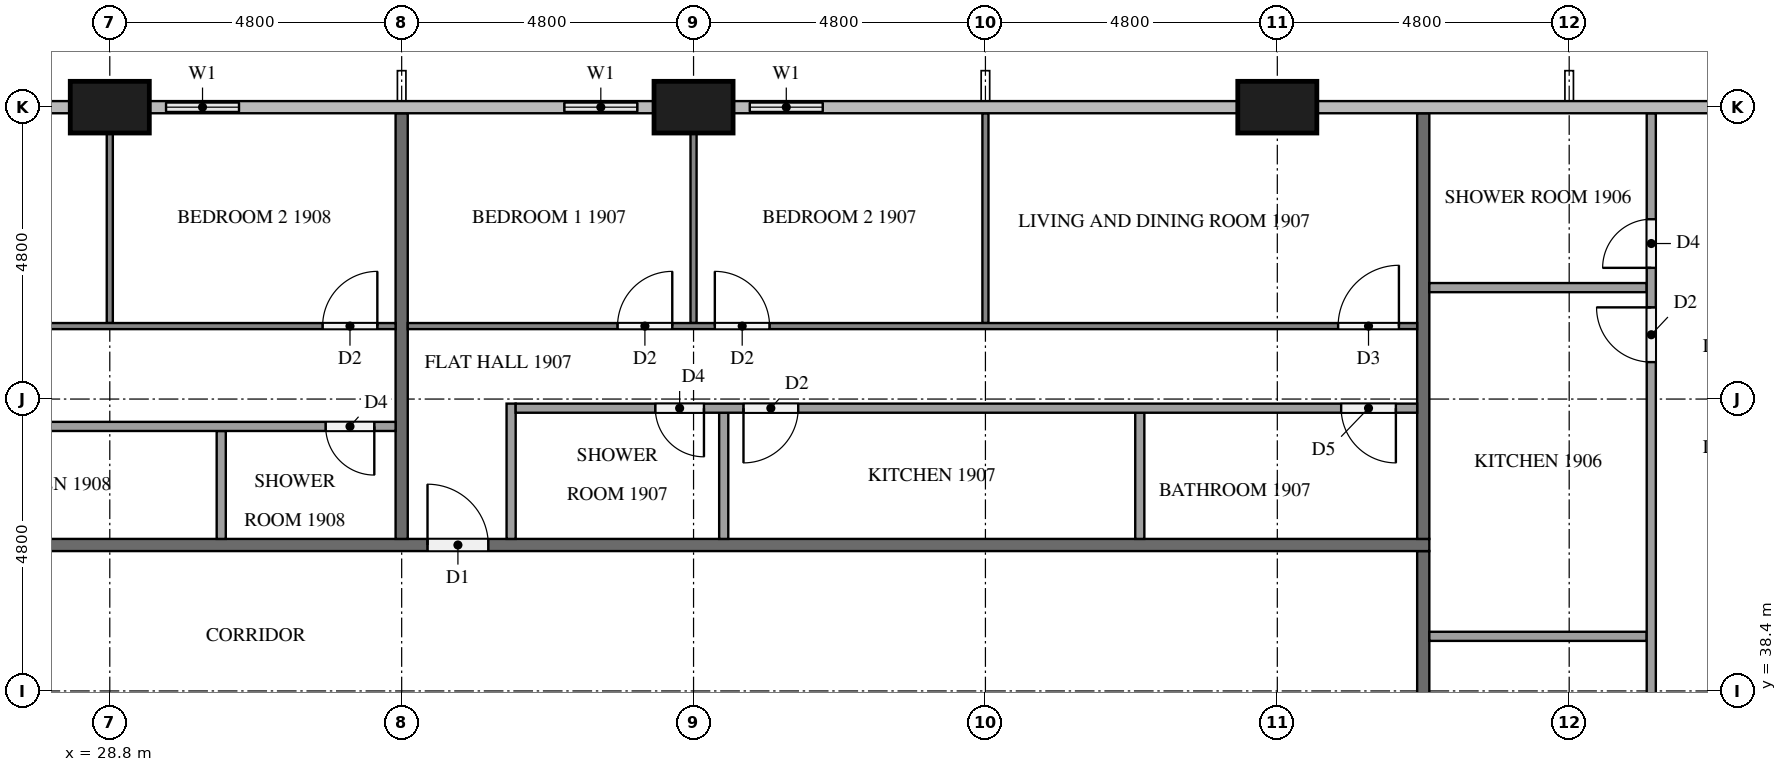
"""IFC4 building model, lengths in metres.
Left out: names, types, materials, properties, quantities, classifications, styles, units other than length and angle.
Written with IfcOpenShell. Run it as: python <this file> out.ifc"""

import sys

from ifc_helpers import new_model, si_unit, direction, frame, frame_2d, origin, origin_2d, place, context, subcontext, project, spatial, rectangle, extrude, element, fill, save


model = new_model("IFC4")
c1 = context("Model", 3, precision=1e-05, world=origin(), true_north=direction((0.0, 1.0)))
c2 = subcontext(c1, "Body", "Model", "MODEL_VIEW")
j1 = project(units=[si_unit("LENGTHUNIT", "METRE"), si_unit("PLANEANGLEUNIT", "RADIAN")], contexts=[c1])
p1 = place(None, origin())
s1 = spatial("IfcSite", under=j1, at=p1, CompositionType="ELEMENT")
p2 = place(p1, origin())
s2 = spatial("IfcBuilding", under=s1, at=p2, CompositionType="ELEMENT")
p3 = place(p2, frame((0.0, 0.0, 76.8)))
s3 = spatial("IfcBuildingStorey", under=s2, at=p3, CompositionType="ELEMENT", Elevation=76.8)
for number, where, z_axis, x_axis in (
    (1, (48.0, 48.0, 0.0), (0.0, 0.0, 1.0), (1.0, 0.0, 0.0)),
    (2, (38.4, 48.0, 0.0), (0.0, 0.0, 1.0), (1.0, 0.0, 0.0)),
    (3, (28.8, 48.0, 0.0), (0.0, 0.0, 1.0), (1.0, 0.0, 0.0)),
):
    element("IfcColumn", number, at=place(p3, frame(where, z_axis=z_axis, x_axis=x_axis)), inside=s3, PredefinedType="COLUMN", context=c2, shape_type="SweptSolid", body=[
        extrude(rectangle(XDim=1.3, YDim=0.85, at=origin_2d()), origin(), (0.0, 0.0, 1.0), 3.2),
    ])
p4 = place(p3, frame((40.8, 48.0, 0.0), z_axis=(0.0, 0.0, 1.0), x_axis=(-1.0, 0.0, 0.0)))
e4 = element("IfcWall", 4, at=p4, inside=s3, PredefinedType="SOLIDWALL", context=c2, shape_type="SweptSolid", body=[
    extrude(rectangle(XDim=1.75, YDim=0.15, at=frame_2d((0.875, 0.0))), origin(), (0.0, 0.0, 1.0), 3.2),
])
p5 = place(p4, frame((0.275, 0.0, 0.9)))
e5 = element("IfcOpeningElement", 5, at=p5, cuts=e4, PredefinedType="OPENING", context=c2, shape_type="SweptSolid", body=[
    extrude(rectangle(XDim=1.2, YDim=1.4, at=frame_2d((0.6, 0.7))), frame((0.0, 0.085, 0.0), z_axis=(0.0, -1.0, 0.0), x_axis=(1.0, 0.0, 0.0)), (0.0, 0.0, 1.0), 0.17),
])
p6 = place(p3, frame((37.75, 48.0, 0.0), z_axis=(0.0, 0.0, 1.0), x_axis=(-1.0, 0.0, 0.0)))
e6 = element("IfcWall", 6, at=p6, inside=s3, PredefinedType="SOLIDWALL", context=c2, shape_type="SweptSolid", body=[
    extrude(rectangle(XDim=1.75, YDim=0.15, at=frame_2d((0.875, 0.0))), origin(), (0.0, 0.0, 1.0), 3.2),
])
p7 = place(p6, frame((0.275, 0.0, 0.9)))
e7 = element("IfcOpeningElement", 7, at=p7, cuts=e6, PredefinedType="OPENING", context=c2, shape_type="SweptSolid", body=[
    extrude(rectangle(XDim=1.2, YDim=1.4, at=frame_2d((0.6, 0.7))), frame((0.0, 0.085, 0.0), z_axis=(0.0, -1.0, 0.0), x_axis=(1.0, 0.0, 0.0)), (0.0, 0.0, 1.0), 0.17),
])
p8 = place(p3, frame((31.2, 48.0, 0.0), z_axis=(0.0, 0.0, 1.0), x_axis=(-1.0, 0.0, 0.0)))
e8 = element("IfcWall", 8, at=p8, inside=s3, PredefinedType="SOLIDWALL", context=c2, shape_type="SweptSolid", body=[
    extrude(rectangle(XDim=1.75, YDim=0.15, at=frame_2d((0.875, 0.0))), origin(), (0.0, 0.0, 1.0), 3.2),
])
p9 = place(p8, frame((0.275, 0.0, 0.9)))
e9 = element("IfcOpeningElement", 9, at=p9, cuts=e8, PredefinedType="OPENING", context=c2, shape_type="SweptSolid", body=[
    extrude(rectangle(XDim=1.2, YDim=1.4, at=frame_2d((0.6, 0.7))), frame((0.0, 0.085, 0.0), z_axis=(0.0, -1.0, 0.0), x_axis=(1.0, 0.0, 0.0)), (0.0, 0.0, 1.0), 0.17),
])
p10 = place(p3, frame((50.4, 40.7, 0.0), z_axis=(0.0, 0.0, 1.0), x_axis=(0.0, -1.0, 0.0)))
e10 = element("IfcWall", 10, at=p10, inside=s3, PredefinedType="PARTITIONING", context=c2, shape_type="SweptSolid", body=[
    extrude(rectangle(XDim=28.6, YDim=0.2, at=frame_2d((14.3, 0.0))), origin(), (0.0, 0.0, 1.0), 3.2),
])
p11 = place(p10, frame((21.875, 0.0, 0.0)))
e11 = element("IfcOpeningElement", 11, at=p11, cuts=e10, PredefinedType="OPENING", context=c2, shape_type="SweptSolid", body=[
    extrude(rectangle(XDim=1.1, YDim=2.1, at=frame_2d((0.55, 1.05))), frame((0.0, 0.11, 0.0), z_axis=(0.0, -1.0, 0.0), x_axis=(1.0, 0.0, 0.0)), (0.0, 0.0, 1.0), 0.22),
])
p12 = place(p10, frame((20.075, 0.0, 0.0)))
e12 = element("IfcOpeningElement", 12, at=p12, cuts=e10, PredefinedType="OPENING", context=c2, shape_type="SweptSolid", body=[
    extrude(rectangle(XDim=1.0, YDim=2.1, at=frame_2d((0.5, 1.05))), frame((0.0, 0.11, 0.0), z_axis=(0.0, -1.0, 0.0), x_axis=(1.0, 0.0, 0.0)), (0.0, 0.0, 1.0), 0.22),
])
p13 = place(p10, frame((5.675, 0.0, 0.0)))
e13 = element("IfcOpeningElement", 13, at=p13, cuts=e10, PredefinedType="OPENING", context=c2, shape_type="SweptSolid", body=[
    extrude(rectangle(XDim=1.0, YDim=2.1, at=frame_2d((0.5, 1.05))), frame((0.0, 0.11, 0.0), z_axis=(0.0, -1.0, 0.0), x_axis=(1.0, 0.0, 0.0)), (0.0, 0.0, 1.0), 0.22),
])
p14 = place(p3, frame((11.9, 40.8, 0.0), z_axis=(0.0, 0.0, 1.0), x_axis=(1.0, 0.0, 0.0)))
e14 = element("IfcWall", 14, at=p14, inside=s3, PredefinedType="PARTITIONING", context=c2, shape_type="SweptSolid", body=[
    extrude(rectangle(XDim=38.6, YDim=0.2, at=frame_2d((19.3, 0.0))), origin(), (0.0, 0.0, 1.0), 3.2),
])
p15 = place(p14, frame((22.125, 0.0, 0.0)))
e15 = element("IfcOpeningElement", 15, at=p15, cuts=e14, PredefinedType="OPENING", context=c2, shape_type="SweptSolid", body=[
    extrude(rectangle(XDim=1.0, YDim=2.1, at=frame_2d((0.5, 1.05))), frame((0.0, 0.11, 0.0), z_axis=(0.0, -1.0, 0.0), x_axis=(1.0, 0.0, 0.0)), (0.0, 0.0, 1.0), 0.22),
])
p16 = place(p14, frame((7.725, 0.0, 0.0)))
e16 = element("IfcOpeningElement", 16, at=p16, cuts=e14, PredefinedType="OPENING", context=c2, shape_type="SweptSolid", body=[
    extrude(rectangle(XDim=1.0, YDim=2.1, at=frame_2d((0.5, 1.05))), frame((0.0, 0.11, 0.0), z_axis=(0.0, -1.0, 0.0), x_axis=(1.0, 0.0, 0.0)), (0.0, 0.0, 1.0), 0.22),
])
p17 = place(p14, frame((5.875, 0.0, 0.0)))
e17 = element("IfcOpeningElement", 17, at=p17, cuts=e14, PredefinedType="OPENING", context=c2, shape_type="SweptSolid", body=[
    extrude(rectangle(XDim=1.0, YDim=2.1, at=frame_2d((0.5, 1.05))), frame((0.0, 0.11, 0.0), z_axis=(0.0, -1.0, 0.0), x_axis=(1.0, 0.0, 0.0)), (0.0, 0.0, 1.0), 0.22),
])
for number, where, z_axis, x_axis in (
    (18, (50.4, 40.9, 0.0), (0.0, 0.0, 1.0), (0.0, 1.0, 0.0)),
    (19, (33.6, 47.9, 0.0), (0.0, 0.0, 1.0), (0.0, -1.0, 0.0)),
):
    element("IfcWall", number, at=place(p3, frame(where, z_axis=z_axis, x_axis=x_axis)), inside=s3, PredefinedType="PARTITIONING", context=c2, shape_type="SweptSolid", body=[
        extrude(rectangle(XDim=7.0, YDim=0.2, at=frame_2d((3.5, 0.0))), origin(), (0.0, 0.0, 1.0), 3.2),
    ])
for number, where, z_axis, x_axis in (
    (20, (50.5, 39.298, 0.0), (0.0, 0.0, 1.0), (1.0, 0.0, 0.0)),
    (21, (50.5, 45.033, 0.0), (0.0, 0.0, 1.0), (1.0, 0.0, 0.0)),
):
    element("IfcWall", number, at=place(p3, frame(where, z_axis=z_axis, x_axis=x_axis)), inside=s3, PredefinedType="PARTITIONING", context=c2, shape_type="SweptSolid", body=[
        extrude(rectangle(XDim=3.575, YDim=0.15, at=frame_2d((1.788, 0.0))), origin(), (0.0, 0.0, 1.0), 3.2),
    ])
p18 = place(p3, frame((54.15, 35.475, 0.0), z_axis=(0.0, 0.0, 1.0), x_axis=(0.0, 1.0, 0.0)))
e22 = element("IfcWall", 22, at=p18, inside=s3, PredefinedType="PARTITIONING", context=c2, shape_type="SweptSolid", body=[
    extrude(rectangle(XDim=12.425, YDim=0.15, at=frame_2d((6.212, 0.0))), origin(), (0.0, 0.0, 1.0), 3.2),
])
p19 = place(p18, frame((0.3, 0.0, 0.0)))
e23 = element("IfcOpeningElement", 23, at=p19, cuts=e22, PredefinedType="OPENING", context=c2, shape_type="SweptSolid", body=[
    extrude(rectangle(XDim=0.9, YDim=2.1, at=frame_2d((0.45, 1.05))), frame((0.0, 0.085, 0.0), z_axis=(0.0, -1.0, 0.0), x_axis=(1.0, 0.0, 0.0)), (0.0, 0.0, 1.0), 0.17),
])
p20 = place(p18, frame((8.333, 0.0, 0.0)))
e24 = element("IfcOpeningElement", 24, at=p20, cuts=e22, PredefinedType="OPENING", context=c2, shape_type="SweptSolid", body=[
    extrude(rectangle(XDim=0.9, YDim=2.1, at=frame_2d((0.45, 1.05))), frame((0.0, 0.085, 0.0), z_axis=(0.0, -1.0, 0.0), x_axis=(1.0, 0.0, 0.0)), (0.0, 0.0, 1.0), 0.17),
])
p21 = place(p18, frame((9.883, 0.0, 0.0)))
e25 = element("IfcOpeningElement", 25, at=p21, cuts=e22, PredefinedType="OPENING", context=c2, shape_type="SweptSolid", body=[
    extrude(rectangle(XDim=0.8, YDim=2.1, at=frame_2d((0.4, 1.05))), frame((0.0, 0.085, 0.0), z_axis=(0.0, -1.0, 0.0), x_axis=(1.0, 0.0, 0.0)), (0.0, 0.0, 1.0), 0.17),
])
p22 = place(p3, frame((38.4, 44.45, 0.0), z_axis=(0.0, 0.0, 1.0), x_axis=(0.0, 1.0, 0.0)))
e26 = element("IfcWall", 26, at=p22, inside=s3, PredefinedType="PARTITIONING", context=c2, shape_type="SweptSolid", body=[
    extrude(rectangle(XDim=3.125, YDim=0.1, at=frame_2d((1.562, 0.0))), origin(), (0.0, 0.0, 1.0), 3.2),
])
p23 = place(p3, frame((43.2, 44.45, 0.0), z_axis=(0.0, 0.0, 1.0), x_axis=(0.0, 1.0, 0.0)))
e27 = element("IfcWall", 27, at=p23, inside=s3, PredefinedType="PARTITIONING", context=c2, shape_type="SweptSolid", body=[
    extrude(rectangle(XDim=3.45, YDim=0.1, at=frame_2d((1.725, 0.0))), origin(), (0.0, 0.0, 1.0), 3.2),
])
p24 = place(p3, frame((33.7, 44.4, 0.0), z_axis=(0.0, 0.0, 1.0), x_axis=(1.0, 0.0, 0.0)))
e28 = element("IfcWall", 28, at=p24, inside=s3, PredefinedType="PARTITIONING", context=c2, shape_type="SweptSolid", body=[
    extrude(rectangle(XDim=16.6, YDim=0.1, at=frame_2d((8.3, 0.0))), origin(), (0.0, 0.0, 1.0), 3.2),
])
p25 = place(p24, frame((3.45, 0.0, 0.0)))
e29 = element("IfcOpeningElement", 29, at=p25, cuts=e28, PredefinedType="OPENING", context=c2, shape_type="SweptSolid", body=[
    extrude(rectangle(XDim=0.9, YDim=2.1, at=frame_2d((0.45, 1.05))), frame((0.0, 0.06, 0.0), z_axis=(0.0, -1.0, 0.0), x_axis=(1.0, 0.0, 0.0)), (0.0, 0.0, 1.0), 0.12),
])
p26 = place(p24, frame((5.05, 0.0, 0.0)))
e30 = element("IfcOpeningElement", 30, at=p26, cuts=e28, PredefinedType="OPENING", context=c2, shape_type="SweptSolid", body=[
    extrude(rectangle(XDim=0.9, YDim=2.1, at=frame_2d((0.45, 1.05))), frame((0.0, 0.06, 0.0), z_axis=(0.0, -1.0, 0.0), x_axis=(1.0, 0.0, 0.0)), (0.0, 0.0, 1.0), 0.12),
])
p27 = place(p24, frame((15.3, 0.0, 0.0)))
e31 = element("IfcOpeningElement", 31, at=p27, cuts=e28, PredefinedType="OPENING", context=c2, shape_type="SweptSolid", body=[
    extrude(rectangle(XDim=1.0, YDim=2.1, at=frame_2d((0.5, 1.05))), frame((0.0, 0.06, 0.0), z_axis=(0.0, -1.0, 0.0), x_axis=(1.0, 0.0, 0.0)), (0.0, 0.0, 1.0), 0.12),
])
for number, where, z_axis, x_axis in (
    (32, (38.896, 40.9, 0.0), (0.0, 0.0, 1.0), (0.0, 1.0, 0.0)),
    (33, (45.739, 40.9, 0.0), (0.0, 0.0, 1.0), (0.0, 1.0, 0.0)),
):
    element("IfcWall", number, at=place(p3, frame(where, z_axis=z_axis, x_axis=x_axis)), inside=s3, PredefinedType="PARTITIONING", context=c2, shape_type="SweptSolid", body=[
        extrude(rectangle(XDim=2.075, YDim=0.15, at=frame_2d((1.038, 0.0))), origin(), (0.0, 0.0, 1.0), 3.2),
    ])
p28 = place(p3, frame((35.4, 40.9, 0.0), z_axis=(0.0, 0.0, 1.0), x_axis=(0.0, 1.0, 0.0)))
e34 = element("IfcWall", 34, at=p28, inside=s3, PredefinedType="PARTITIONING", context=c2, shape_type="SweptSolid", body=[
    extrude(rectangle(XDim=2.225, YDim=0.15, at=frame_2d((1.113, 0.0))), origin(), (0.0, 0.0, 1.0), 3.2),
])
p29 = place(p3, frame((50.3, 43.05, 0.0), z_axis=(0.0, 0.0, 1.0), x_axis=(-1.0, 0.0, 0.0)))
e35 = element("IfcWall", 35, at=p29, inside=s3, PredefinedType="PARTITIONING", context=c2, shape_type="SweptSolid", body=[
    extrude(rectangle(XDim=14.825, YDim=0.15, at=frame_2d((7.413, 0.0))), origin(), (0.0, 0.0, 1.0), 3.2),
])
p30 = place(p29, frame((11.729, 0.0, 0.0)))
e36 = element("IfcOpeningElement", 36, at=p30, cuts=e35, PredefinedType="OPENING", context=c2, shape_type="SweptSolid", body=[
    extrude(rectangle(XDim=0.8, YDim=2.1, at=frame_2d((0.4, 1.05))), frame((0.0, 0.085, 0.0), z_axis=(0.0, -1.0, 0.0), x_axis=(1.0, 0.0, 0.0)), (0.0, 0.0, 1.0), 0.17),
])
p31 = place(p29, frame((10.179, 0.0, 0.0)))
e37 = element("IfcOpeningElement", 37, at=p31, cuts=e35, PredefinedType="OPENING", context=c2, shape_type="SweptSolid", body=[
    extrude(rectangle(XDim=0.9, YDim=2.1, at=frame_2d((0.45, 1.05))), frame((0.0, 0.085, 0.0), z_axis=(0.0, -1.0, 0.0), x_axis=(1.0, 0.0, 0.0)), (0.0, 0.0, 1.0), 0.17),
])
p32 = place(p29, frame((0.35, 0.0, 0.0)))
e38 = element("IfcOpeningElement", 38, at=p32, cuts=e35, PredefinedType="OPENING", context=c2, shape_type="SweptSolid", body=[
    extrude(rectangle(XDim=0.9, YDim=2.1, at=frame_2d((0.45, 1.05))), frame((0.0, 0.085, 0.0), z_axis=(0.0, -1.0, 0.0), x_axis=(1.0, 0.0, 0.0)), (0.0, 0.0, 1.0), 0.17),
])
p33 = place(p3, frame((28.8, 44.45, 0.0), z_axis=(0.0, 0.0, 1.0), x_axis=(0.0, 1.0, 0.0)))
e39 = element("IfcWall", 39, at=p33, inside=s3, PredefinedType="PARTITIONING", context=c2, shape_type="SweptSolid", body=[
    extrude(rectangle(XDim=3.125, YDim=0.1, at=frame_2d((1.562, 0.0))), origin(), (0.0, 0.0, 1.0), 3.2),
])
p34 = place(p3, frame((19.3, 44.4, 0.0), z_axis=(0.0, 0.0, 1.0), x_axis=(1.0, 0.0, 0.0)))
e40 = element("IfcWall", 40, at=p34, inside=s3, PredefinedType="PARTITIONING", context=c2, shape_type="SweptSolid", body=[
    extrude(rectangle(XDim=14.2, YDim=0.1, at=frame_2d((7.1, 0.0))), origin(), (0.0, 0.0, 1.0), 3.2),
])
p35 = place(p34, frame((3.45, 0.0, 0.0)))
e41 = element("IfcOpeningElement", 41, at=p35, cuts=e40, PredefinedType="OPENING", context=c2, shape_type="SweptSolid", body=[
    extrude(rectangle(XDim=0.9, YDim=2.1, at=frame_2d((0.45, 1.05))), frame((0.0, 0.06, 0.0), z_axis=(0.0, -1.0, 0.0), x_axis=(1.0, 0.0, 0.0)), (0.0, 0.0, 1.0), 0.12),
])
p36 = place(p34, frame((5.05, 0.0, 0.0)))
e42 = element("IfcOpeningElement", 42, at=p36, cuts=e40, PredefinedType="OPENING", context=c2, shape_type="SweptSolid", body=[
    extrude(rectangle(XDim=1.0, YDim=2.1, at=frame_2d((0.5, 1.05))), frame((0.0, 0.06, 0.0), z_axis=(0.0, -1.0, 0.0), x_axis=(1.0, 0.0, 0.0)), (0.0, 0.0, 1.0), 0.12),
])
p37 = place(p34, frame((13.0, 0.0, 0.0)))
e43 = element("IfcOpeningElement", 43, at=p37, cuts=e40, PredefinedType="OPENING", context=c2, shape_type="SweptSolid", body=[
    extrude(rectangle(XDim=0.9, YDim=2.1, at=frame_2d((0.45, 1.05))), frame((0.0, 0.06, 0.0), z_axis=(0.0, -1.0, 0.0), x_axis=(1.0, 0.0, 0.0)), (0.0, 0.0, 1.0), 0.12),
])
p38 = place(p3, frame((30.633, 40.9, 0.0), z_axis=(0.0, 0.0, 1.0), x_axis=(0.0, 1.0, 0.0)))
e44 = element("IfcWall", 44, at=p38, inside=s3, PredefinedType="PARTITIONING", context=c2, shape_type="SweptSolid", body=[
    extrude(rectangle(XDim=1.775, YDim=0.15, at=frame_2d((0.888, 0.0))), origin(), (0.0, 0.0, 1.0), 3.2),
])
p39 = place(p3, frame((33.5, 42.75, 0.0), z_axis=(0.0, 0.0, 1.0), x_axis=(-1.0, 0.0, 0.0)))
e45 = element("IfcWall", 45, at=p39, inside=s3, PredefinedType="PARTITIONING", context=c2, shape_type="SweptSolid", body=[
    extrude(rectangle(XDim=12.425, YDim=0.15, at=frame_2d((6.212, 0.0))), origin(), (0.0, 0.0, 1.0), 3.2),
])
p40 = place(p39, frame((8.927, 0.0, 0.0)))
e46 = element("IfcOpeningElement", 46, at=p40, cuts=e45, PredefinedType="OPENING", context=c2, shape_type="SweptSolid", body=[
    extrude(rectangle(XDim=0.9, YDim=2.1, at=frame_2d((0.45, 1.05))), frame((0.0, 0.085, 0.0), z_axis=(0.0, -1.0, 0.0), x_axis=(1.0, 0.0, 0.0)), (0.0, 0.0, 1.0), 0.17),
])
p41 = place(p39, frame((7.377, 0.0, 0.0)))
e47 = element("IfcOpeningElement", 47, at=p41, cuts=e45, PredefinedType="OPENING", context=c2, shape_type="SweptSolid", body=[
    extrude(rectangle(XDim=0.9, YDim=2.1, at=frame_2d((0.45, 1.05))), frame((0.0, 0.085, 0.0), z_axis=(0.0, -1.0, 0.0), x_axis=(1.0, 0.0, 0.0)), (0.0, 0.0, 1.0), 0.17),
])
p42 = place(p39, frame((0.35, 0.0, 0.0)))
e48 = element("IfcOpeningElement", 48, at=p42, cuts=e45, PredefinedType="OPENING", context=c2, shape_type="SweptSolid", body=[
    extrude(rectangle(XDim=0.8, YDim=2.1, at=frame_2d((0.4, 1.05))), frame((0.0, 0.085, 0.0), z_axis=(0.0, -1.0, 0.0), x_axis=(1.0, 0.0, 0.0)), (0.0, 0.0, 1.0), 0.17),
])
p43 = place(p5, origin())
e49 = element("IfcWindow", 49, at=p43, inside=s3, PartitioningType="SINGLE_PANEL", PredefinedType="WINDOW", context=c2, shape_type="SweptSolid", body=[
    extrude(rectangle(XDim=1.2, YDim=1.4, at=frame_2d((0.6, 0.7))), frame((0.0, 0.03, 0.0), z_axis=(0.0, -1.0, 0.0), x_axis=(1.0, 0.0, 0.0)), (0.0, 0.0, 1.0), 0.06),
])
fill(e5, e49)
p44 = place(p7, origin())
e50 = element("IfcWindow", 50, at=p44, inside=s3, PartitioningType="SINGLE_PANEL", PredefinedType="WINDOW", context=c2, shape_type="SweptSolid", body=[
    extrude(rectangle(XDim=1.2, YDim=1.4, at=frame_2d((0.6, 0.7))), frame((0.0, 0.03, 0.0), z_axis=(0.0, -1.0, 0.0), x_axis=(1.0, 0.0, 0.0)), (0.0, 0.0, 1.0), 0.06),
])
fill(e7, e50)
p45 = place(p9, origin())
e51 = element("IfcWindow", 51, at=p45, inside=s3, PartitioningType="SINGLE_PANEL", PredefinedType="WINDOW", context=c2, shape_type="SweptSolid", body=[
    extrude(rectangle(XDim=1.2, YDim=1.4, at=frame_2d((0.6, 0.7))), frame((0.0, 0.03, 0.0), z_axis=(0.0, -1.0, 0.0), x_axis=(1.0, 0.0, 0.0)), (0.0, 0.0, 1.0), 0.06),
])
fill(e9, e51)
p46 = place(p15, origin())
e52 = element("IfcDoor", 52, at=p46, inside=s3, OperationType="SINGLE_SWING_LEFT", PredefinedType="DOOR", context=c2, shape_type="SweptSolid", body=[
    extrude(rectangle(XDim=1.0, YDim=2.1, at=frame_2d((0.5, 1.05))), frame((0.0, 0.025, 0.0), z_axis=(0.0, -1.0, 0.0), x_axis=(1.0, 0.0, 0.0)), (0.0, 0.0, 1.0), 0.05),
])
fill(e15, e52)
p47 = place(p20, origin())
e53 = element("IfcDoor", 53, at=p47, inside=s3, OperationType="SINGLE_SWING_RIGHT", PredefinedType="DOOR", context=c2, shape_type="SweptSolid", body=[
    extrude(rectangle(XDim=0.9, YDim=2.1, at=frame_2d((0.45, 1.05))), frame((0.0, 0.025, 0.0), z_axis=(0.0, -1.0, 0.0), x_axis=(1.0, 0.0, 0.0)), (0.0, 0.0, 1.0), 0.05),
])
fill(e24, e53)
p48 = place(p21, origin())
e54 = element("IfcDoor", 54, at=p48, inside=s3, OperationType="SINGLE_SWING_LEFT", PredefinedType="DOOR", context=c2, shape_type="SweptSolid", body=[
    extrude(rectangle(XDim=0.8, YDim=2.1, at=frame_2d((0.4, 1.05))), frame((0.0, 0.025, 0.0), z_axis=(0.0, -1.0, 0.0), x_axis=(1.0, 0.0, 0.0)), (0.0, 0.0, 1.0), 0.05),
])
fill(e25, e54)
p49 = place(p25, origin())
e55 = element("IfcDoor", 55, at=p49, inside=s3, OperationType="SINGLE_SWING_RIGHT", PredefinedType="DOOR", context=c2, shape_type="SweptSolid", body=[
    extrude(rectangle(XDim=0.9, YDim=2.1, at=frame_2d((0.45, 1.05))), frame((0.0, 0.025, 0.0), z_axis=(0.0, -1.0, 0.0), x_axis=(1.0, 0.0, 0.0)), (0.0, 0.0, 1.0), 0.05),
])
fill(e29, e55)
p50 = place(p26, origin())
e56 = element("IfcDoor", 56, at=p50, inside=s3, OperationType="SINGLE_SWING_LEFT", PredefinedType="DOOR", context=c2, shape_type="SweptSolid", body=[
    extrude(rectangle(XDim=0.9, YDim=2.1, at=frame_2d((0.45, 1.05))), frame((0.0, 0.025, 0.0), z_axis=(0.0, -1.0, 0.0), x_axis=(1.0, 0.0, 0.0)), (0.0, 0.0, 1.0), 0.05),
])
fill(e30, e56)
p51 = place(p27, origin())
e57 = element("IfcDoor", 57, at=p51, inside=s3, OperationType="SINGLE_SWING_RIGHT", PredefinedType="DOOR", context=c2, shape_type="SweptSolid", body=[
    extrude(rectangle(XDim=1.0, YDim=2.1, at=frame_2d((0.5, 1.05))), frame((0.0, 0.025, 0.0), z_axis=(0.0, -1.0, 0.0), x_axis=(1.0, 0.0, 0.0)), (0.0, 0.0, 1.0), 0.05),
])
fill(e31, e57)
p52 = place(p30, origin())
e58 = element("IfcDoor", 58, at=p52, inside=s3, OperationType="SINGLE_SWING_LEFT", PredefinedType="DOOR", context=c2, shape_type="SweptSolid", body=[
    extrude(rectangle(XDim=0.8, YDim=2.1, at=frame_2d((0.4, 1.05))), frame((0.0, 0.025, 0.0), z_axis=(0.0, -1.0, 0.0), x_axis=(1.0, 0.0, 0.0)), (0.0, 0.0, 1.0), 0.05),
])
fill(e36, e58)
p53 = place(p31, origin())
e59 = element("IfcDoor", 59, at=p53, inside=s3, OperationType="SINGLE_SWING_RIGHT", PredefinedType="DOOR", context=c2, shape_type="SweptSolid", body=[
    extrude(rectangle(XDim=0.9, YDim=2.1, at=frame_2d((0.45, 1.05))), frame((0.0, 0.025, 0.0), z_axis=(0.0, -1.0, 0.0), x_axis=(1.0, 0.0, 0.0)), (0.0, 0.0, 1.0), 0.05),
])
fill(e37, e59)
p54 = place(p32, origin())
e60 = element("IfcDoor", 60, at=p54, inside=s3, OperationType="SINGLE_SWING_LEFT", PredefinedType="DOOR", context=c2, shape_type="SweptSolid", body=[
    extrude(rectangle(XDim=0.9, YDim=2.1, at=frame_2d((0.45, 1.05))), frame((0.0, 0.025, 0.0), z_axis=(0.0, -1.0, 0.0), x_axis=(1.0, 0.0, 0.0)), (0.0, 0.0, 1.0), 0.05),
])
fill(e38, e60)
p55 = place(p37, origin())
e61 = element("IfcDoor", 61, at=p55, inside=s3, OperationType="SINGLE_SWING_RIGHT", PredefinedType="DOOR", context=c2, shape_type="SweptSolid", body=[
    extrude(rectangle(XDim=0.9, YDim=2.1, at=frame_2d((0.45, 1.05))), frame((0.0, 0.025, 0.0), z_axis=(0.0, -1.0, 0.0), x_axis=(1.0, 0.0, 0.0)), (0.0, 0.0, 1.0), 0.05),
])
fill(e43, e61)
p56 = place(p42, origin())
e62 = element("IfcDoor", 62, at=p56, inside=s3, OperationType="SINGLE_SWING_LEFT", PredefinedType="DOOR", context=c2, shape_type="SweptSolid", body=[
    extrude(rectangle(XDim=0.8, YDim=2.1, at=frame_2d((0.4, 1.05))), frame((0.0, 0.025, 0.0), z_axis=(0.0, -1.0, 0.0), x_axis=(1.0, 0.0, 0.0)), (0.0, 0.0, 1.0), 0.05),
])
fill(e48, e62)
save(model, sys.argv[1])
